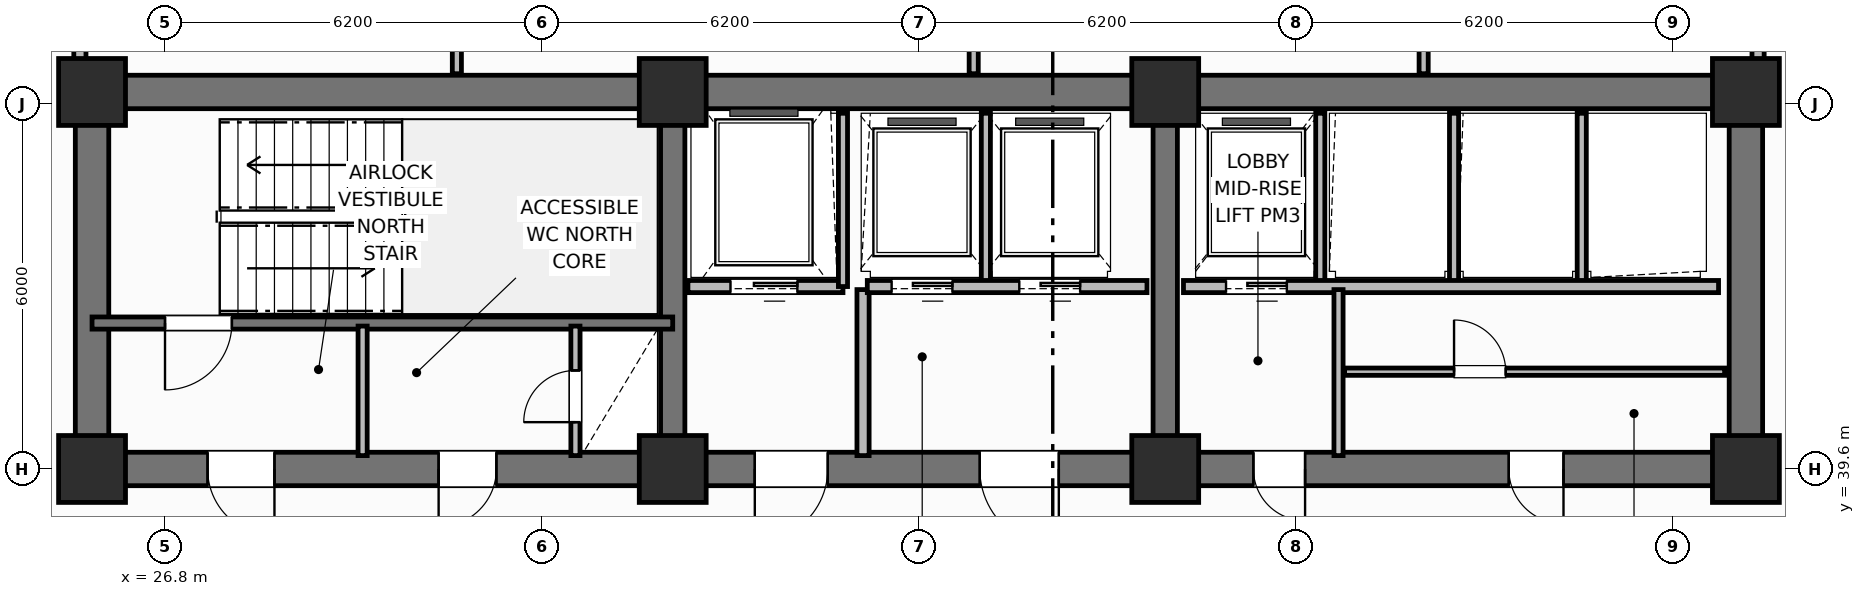
"""IFC4 building model, lengths in metres.
Left out: names, types, materials, properties, quantities, classifications, styles, units other than length and angle.
Written with IfcOpenShell. Run it as: python <this file> out.ifc"""

import sys

from ifc_helpers import new_model, si_unit, direction, frame, frame_2d, origin, origin_2d, place, context, subcontext, project, spatial, rectangle, extrude, element, fill, save


model = new_model("IFC4")
c1 = context("Model", 3, precision=1e-05, world=origin(), true_north=direction((0.0, 1.0)))
c2 = subcontext(c1, "Body", "Model", "MODEL_VIEW")
j1 = project(units=[si_unit("LENGTHUNIT", "METRE"), si_unit("PLANEANGLEUNIT", "RADIAN")], contexts=[c1])
p1 = place(None, origin())
s1 = spatial("IfcSite", under=j1, at=p1, CompositionType="ELEMENT")
p2 = place(p1, origin())
s2 = spatial("IfcBuilding", under=s1, at=p2, CompositionType="ELEMENT")
p3 = place(p2, frame((0.0, 0.0, 106.8)))
s3 = spatial("IfcBuildingStorey", under=s2, at=p3, CompositionType="ELEMENT", Elevation=106.8)
p4 = place(p3, frame((25.6, 45.8, 0.0), z_axis=(0.0, 0.0, 1.0), x_axis=(1.0, 0.0, 0.0)))
e1 = element("IfcWall", 1, at=p4, inside=s3, PredefinedType="SHEAR", context=c2, shape_type="SweptSolid", body=[
    extrude(rectangle(XDim=27.2, YDim=0.55, at=frame_2d((13.6, 0.0))), origin(), (0.0, 0.0, 1.0), 3.7),
])
for number, where, z_axis, x_axis in (
    (2, (25.6, 39.875, 0.0), (0.0, 0.0, 1.0), (0.0, 1.0, 0.0)),
    (3, (52.8, 39.875, 0.0), (0.0, 0.0, 1.0), (0.0, 1.0, 0.0)),
):
    element("IfcWall", number, at=place(p3, frame(where, z_axis=z_axis, x_axis=x_axis)), inside=s3, PredefinedType="SHEAR", context=c2, shape_type="SweptSolid", body=[
        extrude(rectangle(XDim=5.65, YDim=0.55, at=frame_2d((2.825, 0.0))), origin(), (0.0, 0.0, 1.0), 3.7),
    ])
p5 = place(p3, frame((52.8, 39.6, 0.0), z_axis=(0.0, 0.0, 1.0), x_axis=(-1.0, 0.0, 0.0)))
e4 = element("IfcWall", 4, at=p5, inside=s3, PredefinedType="SHEAR", context=c2, shape_type="SweptSolid", body=[
    extrude(rectangle(XDim=27.2, YDim=0.55, at=frame_2d((13.6, 0.0))), origin(), (0.0, 0.0, 1.0), 3.7),
])
p6 = place(p5, frame((24.2, 0.0, 0.0)))
e5 = element("IfcOpeningElement", 5, at=p6, cuts=e4, PredefinedType="OPENING", context=c2, shape_type="SweptSolid", body=[
    extrude(rectangle(XDim=1.1, YDim=2.15, at=frame_2d((0.55, 1.075))), frame((0.0, 0.285, 0.0), z_axis=(0.0, -1.0, 0.0), x_axis=(1.0, 0.0, 0.0)), (0.0, 0.0, 1.0), 0.57),
])
p7 = place(p5, frame((20.55, 0.0, 0.0)))
e6 = element("IfcOpeningElement", 6, at=p7, cuts=e4, PredefinedType="OPENING", context=c2, shape_type="SweptSolid", body=[
    extrude(rectangle(XDim=0.95, YDim=2.1, at=frame_2d((0.475, 1.05))), frame((0.0, 0.285, 0.0), z_axis=(0.0, -1.0, 0.0), x_axis=(1.0, 0.0, 0.0)), (0.0, 0.0, 1.0), 0.57),
])
p8 = place(p5, frame((15.1, 0.0, 0.0)))
e7 = element("IfcOpeningElement", 7, at=p8, cuts=e4, PredefinedType="OPENING", context=c2, shape_type="SweptSolid", body=[
    extrude(rectangle(XDim=1.2, YDim=2.15, at=frame_2d((0.6, 1.075))), frame((0.0, 0.285, 0.0), z_axis=(0.0, -1.0, 0.0), x_axis=(1.0, 0.0, 0.0)), (0.0, 0.0, 1.0), 0.57),
])
p9 = place(p5, frame((11.3, 0.0, 0.0)))
e8 = element("IfcOpeningElement", 8, at=p9, cuts=e4, PredefinedType="OPENING", context=c2, shape_type="SweptSolid", body=[
    extrude(rectangle(XDim=1.3, YDim=2.2, at=frame_2d((0.65, 1.1))), frame((0.0, 0.285, 0.0), z_axis=(0.0, -1.0, 0.0), x_axis=(1.0, 0.0, 0.0)), (0.0, 0.0, 1.0), 0.57),
])
p10 = place(p5, frame((7.25, 0.0, 0.0)))
e9 = element("IfcOpeningElement", 9, at=p10, cuts=e4, PredefinedType="OPENING", context=c2, shape_type="SweptSolid", body=[
    extrude(rectangle(XDim=0.85, YDim=2.1, at=frame_2d((0.425, 1.05))), frame((0.0, 0.285, 0.0), z_axis=(0.0, -1.0, 0.0), x_axis=(1.0, 0.0, 0.0)), (0.0, 0.0, 1.0), 0.57),
])
p11 = place(p5, frame((3.0, 0.0, 0.0)))
e10 = element("IfcOpeningElement", 10, at=p11, cuts=e4, PredefinedType="OPENING", context=c2, shape_type="SweptSolid", body=[
    extrude(rectangle(XDim=0.9, YDim=2.1, at=frame_2d((0.45, 1.05))), frame((0.0, 0.285, 0.0), z_axis=(0.0, -1.0, 0.0), x_axis=(1.0, 0.0, 0.0)), (0.0, 0.0, 1.0), 0.57),
])
for number, where, z_axis, x_axis in (
    (11, (35.15, 39.875, 0.0), (0.0, 0.0, 1.0), (0.0, 1.0, 0.0)),
    (12, (43.25, 39.875, 0.0), (0.0, 0.0, 1.0), (0.0, 1.0, 0.0)),
):
    element("IfcWall", number, at=place(p3, frame(where, z_axis=z_axis, x_axis=x_axis)), inside=s3, PredefinedType="SHEAR", context=c2, shape_type="SweptSolid", body=[
        extrude(rectangle(XDim=5.65, YDim=0.4, at=frame_2d((2.825, 0.0))), origin(), (0.0, 0.0, 1.0), 3.7),
    ])
for number, where, z_axis, x_axis in (
    (13, (25.6, 39.6, 0.0), (0.0, 0.0, 1.0), (1.0, 0.0, 0.0)),
    (14, (25.6, 45.8, 0.0), (0.0, 0.0, 1.0), (1.0, 0.0, 0.0)),
    (15, (35.15, 39.6, 0.0), (0.0, 0.0, 1.0), (1.0, 0.0, 0.0)),
    (16, (35.15, 45.8, 0.0), (0.0, 0.0, 1.0), (1.0, 0.0, 0.0)),
    (17, (43.25, 39.6, 0.0), (0.0, 0.0, 1.0), (1.0, 0.0, 0.0)),
    (18, (43.25, 45.8, 0.0), (0.0, 0.0, 1.0), (1.0, 0.0, 0.0)),
    (19, (52.8, 39.6, 0.0), (0.0, 0.0, 1.0), (1.0, 0.0, 0.0)),
    (20, (52.8, 45.8, 0.0), (0.0, 0.0, 1.0), (1.0, 0.0, 0.0)),
):
    element("IfcColumn", number, at=place(p3, frame(where, z_axis=z_axis, x_axis=x_axis)), inside=s3, PredefinedType="COLUMN", context=c2, shape_type="SweptSolid", body=[
        extrude(rectangle(XDim=1.1, YDim=1.1, at=origin_2d()), origin(), (0.0, 0.0, 1.0), 3.7),
    ])
p12 = place(p3, frame((35.15, 42.0, 0.0), z_axis=(0.0, 0.0, 1.0), x_axis=(-1.0, 0.0, 0.0)))
e21 = element("IfcWall", 21, at=p12, inside=s3, PredefinedType="SHEAR", context=c2, shape_type="SweptSolid", body=[
    extrude(rectangle(XDim=9.55, YDim=0.2, at=frame_2d((4.775, 0.0))), origin(), (0.0, 0.0, 1.0), 3.7),
])
p13 = place(p12, frame((7.25, 0.0, 0.0)))
e22 = element("IfcOpeningElement", 22, at=p13, cuts=e21, PredefinedType="OPENING", context=c2, shape_type="SweptSolid", body=[
    extrude(rectangle(XDim=1.1, YDim=2.15, at=frame_2d((0.55, 1.075))), frame((0.0, 0.11, 0.0), z_axis=(0.0, -1.0, 0.0), x_axis=(1.0, 0.0, 0.0)), (0.0, 0.0, 1.0), 0.22),
])
p14 = place(p3, frame((33.55, 39.82, 0.0), z_axis=(0.0, 0.0, 1.0), x_axis=(0.0, 1.0, 0.0)))
e23 = element("IfcWall", 23, at=p14, inside=s3, PredefinedType="PARTITIONING", context=c2, shape_type="SweptSolid", body=[
    extrude(rectangle(XDim=2.13, YDim=0.15, at=frame_2d((1.065, 0.0))), origin(), (0.0, 0.0, 1.0), 2.53),
])
p15 = place(p14, frame((0.55, 0.0, 0.0)))
e24 = element("IfcOpeningElement", 24, at=p15, cuts=e23, PredefinedType="OPENING", context=c2, shape_type="SweptSolid", body=[
    extrude(rectangle(XDim=0.85, YDim=2.05, at=frame_2d((0.425, 1.025))), frame((0.0, 0.085, 0.0), z_axis=(0.0, -1.0, 0.0), x_axis=(1.0, 0.0, 0.0)), (0.0, 0.0, 1.0), 0.17),
])
p16 = place(p3, frame((30.05, 39.82, 0.0), z_axis=(0.0, 0.0, 1.0), x_axis=(0.0, 1.0, 0.0)))
e25 = element("IfcWall", 25, at=p16, inside=s3, PredefinedType="PARTITIONING", context=c2, shape_type="SweptSolid", body=[
    extrude(rectangle(XDim=2.13, YDim=0.15, at=frame_2d((1.065, 0.0))), origin(), (0.0, 0.0, 1.0), 2.53),
])
p17 = place(p3, frame((37.95, 42.6, 0.0), z_axis=(0.0, 0.0, 1.0), x_axis=(-1.0, 0.0, 0.0)))
e26 = element("IfcWall", 26, at=p17, inside=s3, PredefinedType="PARTITIONING", context=c2, shape_type="SweptSolid", body=[
    extrude(rectangle(XDim=2.55, YDim=0.2, at=frame_2d((1.275, 0.0))), origin(), (0.0, 0.0, 1.0), 2.3),
])
p18 = place(p17, frame((0.75, 0.0, 0.0)))
e27 = element("IfcOpeningElement", 27, at=p18, cuts=e26, PredefinedType="OPENING", context=c2, shape_type="SweptSolid", body=[
    extrude(rectangle(XDim=1.1, YDim=2.15, at=frame_2d((0.55, 1.075))), frame((0.0, 0.11, 0.0), z_axis=(0.0, -1.0, 0.0), x_axis=(1.0, 0.0, 0.0)), (0.0, 0.0, 1.0), 0.22),
])
p19 = place(p3, frame((37.95, 42.6, 0.0), z_axis=(0.0, 0.0, 1.0), x_axis=(0.0, 1.0, 0.0)))
e28 = element("IfcWall", 28, at=p19, inside=s3, PredefinedType="PARTITIONING", context=c2, shape_type="SweptSolid", body=[
    extrude(rectangle(XDim=2.85, YDim=0.15, at=frame_2d((1.425, 0.0))), origin(), (0.0, 0.0, 1.0), 2.53),
])
p20 = place(p3, frame((38.28, 39.82, 0.0), z_axis=(0.0, 0.0, 1.0), x_axis=(0.0, 1.0, 0.0)))
e29 = element("IfcWall", 29, at=p20, inside=s3, PredefinedType="PARTITIONING", context=c2, shape_type="SweptSolid", body=[
    extrude(rectangle(XDim=2.73, YDim=0.2, at=frame_2d((1.365, 0.0))), origin(), (0.0, 0.0, 1.0), 2.53),
])
p21 = place(p3, frame((40.3, 42.65, 0.0), z_axis=(0.0, 0.0, 1.0), x_axis=(0.0, 1.0, 0.0)))
e30 = element("IfcWall", 30, at=p21, inside=s3, PredefinedType="PARTITIONING", context=c2, shape_type="SweptSolid", body=[
    extrude(rectangle(XDim=2.8, YDim=0.15, at=frame_2d((1.4, 0.0))), origin(), (0.0, 0.0, 1.0), 2.53),
])
p22 = place(p3, frame((42.95, 42.6, 0.0), z_axis=(0.0, 0.0, 1.0), x_axis=(-1.0, 0.0, 0.0)))
e31 = element("IfcWall", 31, at=p22, inside=s3, PredefinedType="PARTITIONING", context=c2, shape_type="SweptSolid", body=[
    extrude(rectangle(XDim=4.6, YDim=0.2, at=frame_2d((2.3, 0.0))), origin(), (0.0, 0.0, 1.0), 2.3),
])
p23 = place(p22, frame((3.2, 0.0, 0.0)))
e32 = element("IfcOpeningElement", 32, at=p23, cuts=e31, PredefinedType="OPENING", context=c2, shape_type="SweptSolid", body=[
    extrude(rectangle(XDim=1.0, YDim=2.15, at=frame_2d((0.5, 1.075))), frame((0.0, 0.11, 0.0), z_axis=(0.0, -1.0, 0.0), x_axis=(1.0, 0.0, 0.0)), (0.0, 0.0, 1.0), 0.22),
])
p24 = place(p22, frame((1.1, 0.0, 0.0)))
e33 = element("IfcOpeningElement", 33, at=p24, cuts=e31, PredefinedType="OPENING", context=c2, shape_type="SweptSolid", body=[
    extrude(rectangle(XDim=1.0, YDim=2.15, at=frame_2d((0.5, 1.075))), frame((0.0, 0.11, 0.0), z_axis=(0.0, -1.0, 0.0), x_axis=(1.0, 0.0, 0.0)), (0.0, 0.0, 1.0), 0.22),
])
for number, where, z_axis, x_axis in (
    (34, (45.8, 42.65, 0.0), (0.0, 0.0, 1.0), (0.0, 1.0, 0.0)),
    (35, (48.0, 42.65, 0.0), (0.0, 0.0, 1.0), (0.0, 1.0, 0.0)),
    (36, (50.1, 42.65, 0.0), (0.0, 0.0, 1.0), (0.0, 1.0, 0.0)),
):
    element("IfcWall", number, at=place(p3, frame(where, z_axis=z_axis, x_axis=x_axis)), inside=s3, PredefinedType="PARTITIONING", context=c2, shape_type="SweptSolid", body=[
        extrude(rectangle(XDim=2.8, YDim=0.15, at=frame_2d((1.4, 0.0))), origin(), (0.0, 0.0, 1.0), 2.53),
    ])
p25 = place(p3, frame((52.35, 42.6, 0.0), z_axis=(0.0, 0.0, 1.0), x_axis=(-1.0, 0.0, 0.0)))
e37 = element("IfcWall", 37, at=p25, inside=s3, PredefinedType="PARTITIONING", context=c2, shape_type="SweptSolid", body=[
    extrude(rectangle(XDim=8.8, YDim=0.2, at=frame_2d((4.4, 0.0))), origin(), (0.0, 0.0, 1.0), 2.53),
])
p26 = place(p25, frame((7.1, 0.0, 0.0)))
e38 = element("IfcOpeningElement", 38, at=p26, cuts=e37, PredefinedType="OPENING", context=c2, shape_type="SweptSolid", body=[
    extrude(rectangle(XDim=1.0, YDim=2.15, at=frame_2d((0.5, 1.075))), frame((0.0, 0.11, 0.0), z_axis=(0.0, -1.0, 0.0), x_axis=(1.0, 0.0, 0.0)), (0.0, 0.0, 1.0), 0.22),
])
p27 = place(p3, frame((46.1, 39.82, 0.0), z_axis=(0.0, 0.0, 1.0), x_axis=(0.0, 1.0, 0.0)))
e39 = element("IfcWall", 39, at=p27, inside=s3, PredefinedType="PARTITIONING", context=c2, shape_type="SweptSolid", body=[
    extrude(rectangle(XDim=2.73, YDim=0.15, at=frame_2d((1.365, 0.0))), origin(), (0.0, 0.0, 1.0), 2.53),
])
p28 = place(p3, frame((46.2, 41.2, 0.0), z_axis=(0.0, 0.0, 1.0), x_axis=(1.0, 0.0, 0.0)))
e40 = element("IfcWall", 40, at=p28, inside=s3, PredefinedType="PARTITIONING", context=c2, shape_type="SweptSolid", body=[
    extrude(rectangle(XDim=6.25, YDim=0.12, at=frame_2d((3.125, 0.0))), origin(), (0.0, 0.0, 1.0), 2.53),
])
p29 = place(p28, frame((1.8, 0.0, 0.0)))
e41 = element("IfcOpeningElement", 41, at=p29, cuts=e40, PredefinedType="OPENING", context=c2, shape_type="SweptSolid", body=[
    extrude(rectangle(XDim=0.85, YDim=2.1, at=frame_2d((0.425, 1.05))), frame((0.0, 0.07, 0.0), z_axis=(0.0, -1.0, 0.0), x_axis=(1.0, 0.0, 0.0)), (0.0, 0.0, 1.0), 0.14),
])
p30 = place(p3, frame((31.6, 46.1, 0.0), z_axis=(0.0, 0.0, 1.0), x_axis=(0.0, 1.0, 0.0)))
e42 = element("IfcWall", 42, at=p30, inside=s3, PredefinedType="PARTITIONING", context=c2, shape_type="SweptSolid", body=[
    extrude(rectangle(XDim=5.33, YDim=0.15, at=frame_2d((2.665, 0.0))), origin(), (0.0, 0.0, 1.0), 2.53),
])
p31 = place(p30, frame((0.85, 0.0, 0.0)))
e43 = element("IfcOpeningElement", 43, at=p31, cuts=e42, PredefinedType="OPENING", context=c2, shape_type="SweptSolid", body=[
    extrude(rectangle(XDim=0.9, YDim=2.1, at=frame_2d((0.45, 1.05))), frame((0.0, 0.085, 0.0), z_axis=(0.0, -1.0, 0.0), x_axis=(1.0, 0.0, 0.0)), (0.0, 0.0, 1.0), 0.17),
])
p32 = place(p3, frame((40.1, 46.1, 0.0), z_axis=(0.0, 0.0, 1.0), x_axis=(0.0, 1.0, 0.0)))
e44 = element("IfcWall", 44, at=p32, inside=s3, PredefinedType="PARTITIONING", context=c2, shape_type="SweptSolid", body=[
    extrude(rectangle(XDim=5.33, YDim=0.15, at=frame_2d((2.665, 0.0))), origin(), (0.0, 0.0, 1.0), 2.53),
])
p33 = place(p3, frame((47.5, 46.1, 0.0), z_axis=(0.0, 0.0, 1.0), x_axis=(0.0, 1.0, 0.0)))
e45 = element("IfcWall", 45, at=p33, inside=s3, PredefinedType="PARTITIONING", context=c2, shape_type="SweptSolid", body=[
    extrude(rectangle(XDim=5.33, YDim=0.15, at=frame_2d((2.665, 0.0))), origin(), (0.0, 0.0, 1.0), 2.53),
])
p34 = place(p33, frame((0.85, 0.0, 0.0)))
e46 = element("IfcOpeningElement", 46, at=p34, cuts=e45, PredefinedType="OPENING", context=c2, shape_type="SweptSolid", body=[
    extrude(rectangle(XDim=0.9, YDim=2.1, at=frame_2d((0.45, 1.05))), frame((0.0, 0.085, 0.0), z_axis=(0.0, -1.0, 0.0), x_axis=(1.0, 0.0, 0.0)), (0.0, 0.0, 1.0), 0.17),
])
p35 = place(p3, frame((25.4, 46.1, 0.0), z_axis=(0.0, 0.0, 1.0), x_axis=(0.0, 1.0, 0.0)))
e47 = element("IfcWall", 47, at=p35, inside=s3, PredefinedType="PARTITIONING", context=c2, shape_type="SweptSolid", body=[
    extrude(rectangle(XDim=3.98, YDim=0.2, at=frame_2d((1.99, 0.0))), origin(), (0.0, 0.0, 1.0), 2.53),
])
p36 = place(p35, frame((1.05, 0.0, 0.0)))
e48 = element("IfcOpeningElement", 48, at=p36, cuts=e47, PredefinedType="OPENING", context=c2, shape_type="SweptSolid", body=[
    extrude(rectangle(XDim=0.9, YDim=2.1, at=frame_2d((0.45, 1.05))), frame((0.0, 0.11, 0.0), z_axis=(0.0, -1.0, 0.0), x_axis=(1.0, 0.0, 0.0)), (0.0, 0.0, 1.0), 0.22),
])
p37 = place(p3, frame((53.0, 46.1, 0.0), z_axis=(0.0, 0.0, 1.0), x_axis=(0.0, 1.0, 0.0)))
e49 = element("IfcWall", 49, at=p37, inside=s3, PredefinedType="PARTITIONING", context=c2, shape_type="SweptSolid", body=[
    extrude(rectangle(XDim=3.98, YDim=0.2, at=frame_2d((1.99, 0.0))), origin(), (0.0, 0.0, 1.0), 2.53),
])
p38 = place(p37, frame((1.05, 0.0, 0.0)))
e50 = element("IfcOpeningElement", 50, at=p38, cuts=e49, PredefinedType="OPENING", context=c2, shape_type="SweptSolid", body=[
    extrude(rectangle(XDim=0.9, YDim=2.1, at=frame_2d((0.45, 1.05))), frame((0.0, 0.11, 0.0), z_axis=(0.0, -1.0, 0.0), x_axis=(1.0, 0.0, 0.0)), (0.0, 0.0, 1.0), 0.22),
])
p39 = place(p13, origin())
e51 = element("IfcDoor", 51, at=p39, inside=s3, OperationType="SINGLE_SWING_RIGHT", PredefinedType="DOOR", context=c2, shape_type="SweptSolid", body=[
    extrude(rectangle(XDim=1.1, YDim=2.15, at=frame_2d((0.55, 1.075))), frame((0.0, 0.025, 0.0), z_axis=(0.0, -1.0, 0.0), x_axis=(1.0, 0.0, 0.0)), (0.0, 0.0, 1.0), 0.05),
])
fill(e22, e51)
p40 = place(p15, origin())
e52 = element("IfcDoor", 52, at=p40, inside=s3, OperationType="SINGLE_SWING_LEFT", PredefinedType="TRAPDOOR", context=c2, shape_type="SweptSolid", body=[
    extrude(rectangle(XDim=0.85, YDim=2.05, at=frame_2d((0.425, 1.025))), frame((0.0, 0.025, 0.0), z_axis=(0.0, -1.0, 0.0), x_axis=(1.0, 0.0, 0.0)), (0.0, 0.0, 1.0), 0.05),
])
fill(e24, e52)
p41 = place(p18, origin())
e53 = element("IfcDoor", 53, at=p41, inside=s3, OperationType="SLIDING_TO_LEFT", PredefinedType="DOOR", context=c2, shape_type="SweptSolid", body=[
    extrude(rectangle(XDim=1.1, YDim=2.15, at=frame_2d((0.55, 1.075))), frame((0.0, 0.025, 0.0), z_axis=(0.0, -1.0, 0.0), x_axis=(1.0, 0.0, 0.0)), (0.0, 0.0, 1.0), 0.05),
])
fill(e27, e53)
p42 = place(p23, origin())
e54 = element("IfcDoor", 54, at=p42, inside=s3, OperationType="SLIDING_TO_LEFT", PredefinedType="DOOR", context=c2, shape_type="SweptSolid", body=[
    extrude(rectangle(XDim=1.0, YDim=2.15, at=frame_2d((0.5, 1.075))), frame((0.0, 0.025, 0.0), z_axis=(0.0, -1.0, 0.0), x_axis=(1.0, 0.0, 0.0)), (0.0, 0.0, 1.0), 0.05),
])
fill(e32, e54)
p43 = place(p24, origin())
e55 = element("IfcDoor", 55, at=p43, inside=s3, OperationType="SLIDING_TO_LEFT", PredefinedType="DOOR", context=c2, shape_type="SweptSolid", body=[
    extrude(rectangle(XDim=1.0, YDim=2.15, at=frame_2d((0.5, 1.075))), frame((0.0, 0.025, 0.0), z_axis=(0.0, -1.0, 0.0), x_axis=(1.0, 0.0, 0.0)), (0.0, 0.0, 1.0), 0.05),
])
fill(e33, e55)
p44 = place(p26, origin())
e56 = element("IfcDoor", 56, at=p44, inside=s3, OperationType="SLIDING_TO_LEFT", PredefinedType="DOOR", context=c2, shape_type="SweptSolid", body=[
    extrude(rectangle(XDim=1.0, YDim=2.15, at=frame_2d((0.5, 1.075))), frame((0.0, 0.025, 0.0), z_axis=(0.0, -1.0, 0.0), x_axis=(1.0, 0.0, 0.0)), (0.0, 0.0, 1.0), 0.05),
])
fill(e38, e56)
p45 = place(p29, origin())
e57 = element("IfcDoor", 57, at=p45, inside=s3, OperationType="SINGLE_SWING_LEFT", PredefinedType="DOOR", context=c2, shape_type="SweptSolid", body=[
    extrude(rectangle(XDim=0.85, YDim=2.1, at=frame_2d((0.425, 1.05))), frame((0.0, 0.025, 0.0), z_axis=(0.0, -1.0, 0.0), x_axis=(1.0, 0.0, 0.0)), (0.0, 0.0, 1.0), 0.05),
])
fill(e41, e57)
p46 = place(p6, origin())
e58 = element("IfcDoor", 58, at=p46, inside=s3, OperationType="SINGLE_SWING_LEFT", PredefinedType="DOOR", context=c2, shape_type="SweptSolid", body=[
    extrude(rectangle(XDim=1.1, YDim=2.15, at=frame_2d((0.55, 1.075))), frame((0.0, 0.025, 0.0), z_axis=(0.0, -1.0, 0.0), x_axis=(1.0, 0.0, 0.0)), (0.0, 0.0, 1.0), 0.05),
])
fill(e5, e58)
p47 = place(p7, origin())
e59 = element("IfcDoor", 59, at=p47, inside=s3, OperationType="SINGLE_SWING_RIGHT", PredefinedType="DOOR", context=c2, shape_type="SweptSolid", body=[
    extrude(rectangle(XDim=0.95, YDim=2.1, at=frame_2d((0.475, 1.05))), frame((0.0, 0.025, 0.0), z_axis=(0.0, -1.0, 0.0), x_axis=(1.0, 0.0, 0.0)), (0.0, 0.0, 1.0), 0.05),
])
fill(e6, e59)
p48 = place(p8, origin())
e60 = element("IfcDoor", 60, at=p48, inside=s3, OperationType="SINGLE_SWING_RIGHT", PredefinedType="DOOR", context=c2, shape_type="SweptSolid", body=[
    extrude(rectangle(XDim=1.2, YDim=2.15, at=frame_2d((0.6, 1.075))), frame((0.0, 0.025, 0.0), z_axis=(0.0, -1.0, 0.0), x_axis=(1.0, 0.0, 0.0)), (0.0, 0.0, 1.0), 0.05),
])
fill(e7, e60)
p49 = place(p9, origin())
e61 = element("IfcDoor", 61, at=p49, inside=s3, OperationType="SINGLE_SWING_LEFT", PredefinedType="DOOR", context=c2, shape_type="SweptSolid", body=[
    extrude(rectangle(XDim=1.3, YDim=2.2, at=frame_2d((0.65, 1.1))), frame((0.0, 0.025, 0.0), z_axis=(0.0, -1.0, 0.0), x_axis=(1.0, 0.0, 0.0)), (0.0, 0.0, 1.0), 0.05),
])
fill(e8, e61)
p50 = place(p10, origin())
e62 = element("IfcDoor", 62, at=p50, inside=s3, OperationType="SINGLE_SWING_LEFT", PredefinedType="DOOR", context=c2, shape_type="SweptSolid", body=[
    extrude(rectangle(XDim=0.85, YDim=2.1, at=frame_2d((0.425, 1.05))), frame((0.0, 0.025, 0.0), z_axis=(0.0, -1.0, 0.0), x_axis=(1.0, 0.0, 0.0)), (0.0, 0.0, 1.0), 0.05),
])
fill(e9, e62)
p51 = place(p11, origin())
e63 = element("IfcDoor", 63, at=p51, inside=s3, OperationType="SINGLE_SWING_LEFT", PredefinedType="DOOR", context=c2, shape_type="SweptSolid", body=[
    extrude(rectangle(XDim=0.9, YDim=2.1, at=frame_2d((0.45, 1.05))), frame((0.0, 0.025, 0.0), z_axis=(0.0, -1.0, 0.0), x_axis=(1.0, 0.0, 0.0)), (0.0, 0.0, 1.0), 0.05),
])
fill(e10, e63)
save(model, sys.argv[1])
